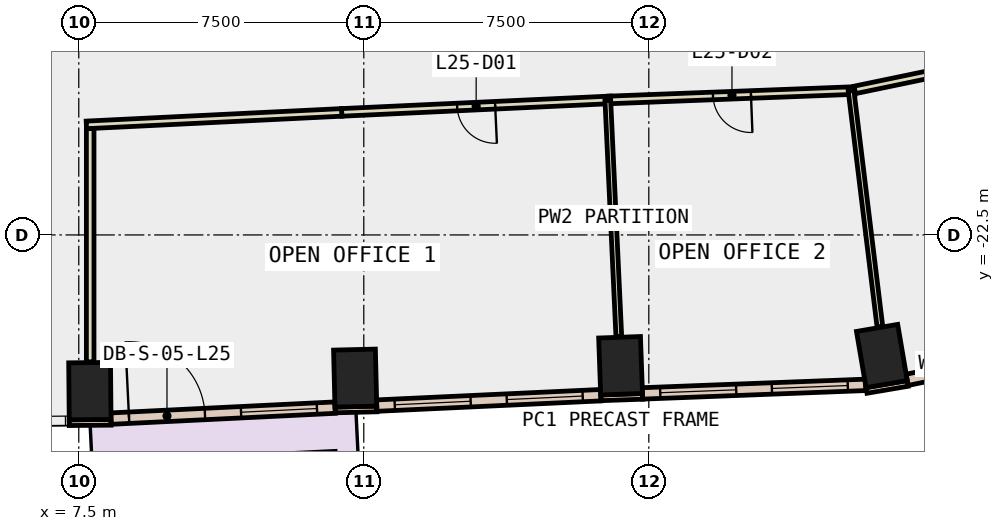
"""IFC4 building model, lengths in metres.
Left out: names, types, materials, properties, quantities, classifications, styles, units other than length and angle.
Written with IfcOpenShell. Run it as: python <this file> out.ifc"""

import sys

from ifc_helpers import new_model, si_unit, direction, frame, frame_2d, origin, origin_2d, place, context, subcontext, project, spatial, rectangle, extrude, element, fill, save


model = new_model("IFC4")
c1 = context("Model", 3, precision=1e-05, world=origin(), true_north=direction((0.0, 1.0)))
c2 = subcontext(c1, "Body", "Model", "MODEL_VIEW")
j1 = project(units=[si_unit("LENGTHUNIT", "METRE"), si_unit("PLANEANGLEUNIT", "RADIAN")], contexts=[c1])
p1 = place(None, origin())
s1 = spatial("IfcSite", under=j1, at=p1, CompositionType="ELEMENT")
p2 = place(p1, origin())
s2 = spatial("IfcBuilding", under=s1, at=p2, CompositionType="ELEMENT")
p3 = place(p2, frame((0.0, 0.0, 116.0)))
s3 = spatial("IfcBuildingStorey", under=s2, at=p3, CompositionType="ELEMENT", Elevation=116.0)
for number, where, z_axis, x_axis in (
    (1, (7.792, -26.61, -0.4), (0.0, 0.0, 1.0), (1.0, 0.009, 0.0)),
    (2, (14.773, -26.267, -0.4), (0.0, 0.0, 1.0), (1.0, 0.024, 0.0)),
    (3, (21.757, -25.942, -0.4), (0.0, 0.0, 1.0), (0.999, 0.035, 0.0)),
    (4, (28.633, -25.686, -0.4), (0.0, 0.0, 1.0), (0.986, 0.168, 0.0)),
):
    element("IfcColumn", number, at=place(p3, frame(where, z_axis=z_axis, x_axis=x_axis)), inside=s3, PredefinedType="COLUMN", context=c2, shape_type="SweptSolid", body=[
        extrude(rectangle(XDim=1.1, YDim=1.5, at=origin_2d()), origin(), (0.0, 0.0, 1.0), 4.2),
    ])
p4 = place(p3, frame((7.249, -27.44, 0.0), z_axis=(0.0, 0.0, 1.0), x_axis=(0.99995860686, 0.009098602504, 0.0)))
e5 = element("IfcWall", 5, at=p4, inside=s3, PredefinedType="STANDARD", context=c2, shape_type="SweptSolid", body=[
    extrude(rectangle(XDim=1.1, YDim=0.15, at=frame_2d((0.55, 0.0))), origin(), (0.0, 0.0, 1.0), 3.8),
])
p5 = place(p3, frame((14.243, -27.105, 0.0), z_axis=(0.0, 0.0, 1.0), x_axis=(0.999723421029, 0.023517683673, 0.0)))
e6 = element("IfcWall", 6, at=p5, inside=s3, PredefinedType="STANDARD", context=c2, shape_type="SweptSolid", body=[
    extrude(rectangle(XDim=1.1, YDim=0.15, at=frame_2d((0.55, 0.0))), origin(), (0.0, 0.0, 1.0), 3.8),
])
p6 = place(p3, frame((21.237, -26.786, 0.0), z_axis=(0.0, 0.0, 1.0), x_axis=(0.999376638472, 0.035303462679, 0.0)))
e7 = element("IfcWall", 7, at=p6, inside=s3, PredefinedType="STANDARD", context=c2, shape_type="SweptSolid", body=[
    extrude(rectangle(XDim=1.1, YDim=0.15, at=frame_2d((0.55, 0.0))), origin(), (0.0, 0.0, 1.0), 3.8),
])
p7 = place(p3, frame((28.229, -26.592, 0.0), z_axis=(0.0, 0.0, 1.0), x_axis=(0.985763338892, 0.168138751323, 0.0)))
e8 = element("IfcWall", 8, at=p7, inside=s3, PredefinedType="STANDARD", context=c2, shape_type="SweptSolid", body=[
    extrude(rectangle(XDim=1.101, YDim=0.15, at=frame_2d((0.55, 0.0))), origin(), (0.0, 0.0, 1.0), 3.8),
])
p8 = place(p3, frame((8.347, -27.333, 0.0), z_axis=(0.0, 0.0, 1.0), x_axis=(0.998800343021, 0.048968099633, 0.0)))
e9 = element("IfcWall", 9, at=p8, inside=s3, PredefinedType="STANDARD", context=c2, shape_type="SweptSolid", body=[
    extrude(rectangle(XDim=5.903, YDim=0.3, at=frame_2d((2.952, 0.0))), origin(), (0.0, 0.0, 1.0), 3.8),
])
p9 = place(p8, frame((0.476, 0.0, 0.0)))
e10 = element("IfcOpeningElement", 10, at=p9, cuts=e9, PredefinedType="OPENING", context=c2, shape_type="SweptSolid", body=[
    extrude(rectangle(XDim=2.0, YDim=2.4, at=frame_2d((1.0, 1.2))), frame((0.0, 0.16, 0.0), z_axis=(0.0, -1.0, 0.0), x_axis=(1.0, 0.0, 0.0)), (0.0, 0.0, 1.0), 0.32),
])
p10 = place(p8, frame((3.427, 0.0, 0.9)))
e11 = element("IfcOpeningElement", 11, at=p10, cuts=e9, PredefinedType="OPENING", context=c2, shape_type="SweptSolid", body=[
    extrude(rectangle(XDim=2.0, YDim=2.6, at=frame_2d((1.0, 1.3))), frame((0.0, 0.16, 0.0), z_axis=(0.0, -1.0, 0.0), x_axis=(1.0, 0.0, 0.0)), (0.0, 0.0, 1.0), 0.32),
])
p11 = place(p3, frame((15.34, -26.991, 0.0), z_axis=(0.0, 0.0, 1.0), x_axis=(0.998922139094, 0.046417238469, 0.0)))
e12 = element("IfcWall", 12, at=p11, inside=s3, PredefinedType="STANDARD", context=c2, shape_type="SweptSolid", body=[
    extrude(rectangle(XDim=5.901, YDim=0.3, at=frame_2d((2.951, 0.0))), origin(), (0.0, 0.0, 1.0), 3.8),
])
p12 = place(p11, frame((0.475, 0.0, 0.9)))
e13 = element("IfcOpeningElement", 13, at=p12, cuts=e12, PredefinedType="OPENING", context=c2, shape_type="SweptSolid", body=[
    extrude(rectangle(XDim=2.0, YDim=2.6, at=frame_2d((1.0, 1.3))), frame((0.0, 0.16, 0.0), z_axis=(0.0, -1.0, 0.0), x_axis=(1.0, 0.0, 0.0)), (0.0, 0.0, 1.0), 0.32),
])
p13 = place(p11, frame((3.426, 0.0, 0.9)))
e14 = element("IfcOpeningElement", 14, at=p13, cuts=e12, PredefinedType="OPENING", context=c2, shape_type="SweptSolid", body=[
    extrude(rectangle(XDim=2.0, YDim=2.6, at=frame_2d((1.0, 1.3))), frame((0.0, 0.16, 0.0), z_axis=(0.0, -1.0, 0.0), x_axis=(1.0, 0.0, 0.0)), (0.0, 0.0, 1.0), 0.32),
])
p14 = place(p3, frame((22.332, -26.67, 0.0), z_axis=(0.0, 0.0, 1.0), x_axis=(0.999267908582, 0.038257638169, 0.0)))
e15 = element("IfcWall", 15, at=p14, inside=s3, PredefinedType="STANDARD", context=c2, shape_type="SweptSolid", body=[
    extrude(rectangle(XDim=5.877, YDim=0.3, at=frame_2d((2.939, 0.0))), origin(), (0.0, 0.0, 1.0), 3.8),
])
p15 = place(p14, frame((0.469, 0.0, 0.9)))
e16 = element("IfcOpeningElement", 16, at=p15, cuts=e15, PredefinedType="OPENING", context=c2, shape_type="SweptSolid", body=[
    extrude(rectangle(XDim=2.0, YDim=2.6, at=frame_2d((1.0, 1.3))), frame((0.0, 0.16, 0.0), z_axis=(0.0, -1.0, 0.0), x_axis=(1.0, 0.0, 0.0)), (0.0, 0.0, 1.0), 0.32),
])
p16 = place(p14, frame((3.408, 0.0, 0.9)))
e17 = element("IfcOpeningElement", 17, at=p16, cuts=e15, PredefinedType="OPENING", context=c2, shape_type="SweptSolid", body=[
    extrude(rectangle(XDim=2.0, YDim=2.6, at=frame_2d((1.0, 1.3))), frame((0.0, 0.16, 0.0), z_axis=(0.0, -1.0, 0.0), x_axis=(1.0, 0.0, 0.0)), (0.0, 0.0, 1.0), 0.32),
])
p17 = place(p3, frame((29.297, -26.313, 0.0), z_axis=(0.0, 0.0, 1.0), x_axis=(0.979080614496, 0.203472726227, 0.0)))
e18 = element("IfcWall", 18, at=p17, inside=s3, PredefinedType="STANDARD", context=c2, shape_type="SweptSolid", body=[
    extrude(rectangle(XDim=4.05, YDim=0.3, at=frame_2d((2.025, 0.0))), origin(), (0.0, 0.0, 1.0), 3.8),
])
p18 = place(p17, frame((1.325, 0.0, 0.9)))
e19 = element("IfcOpeningElement", 19, at=p18, cuts=e18, PredefinedType="OPENING", context=c2, shape_type="SweptSolid", body=[
    extrude(rectangle(XDim=1.4, YDim=2.6, at=frame_2d((0.7, 1.3))), frame((0.0, 0.16, 0.0), z_axis=(0.0, -1.0, 0.0), x_axis=(1.0, 0.0, 0.0)), (0.0, 0.0, 1.0), 0.32),
])
p19 = place(p3, frame((8.468, -28.879, 0.0), z_axis=(0.0, 0.0, 1.0), x_axis=(0.998802192145, 0.048930368554, 0.0)))
e20 = element("IfcWall", 20, at=p19, inside=s3, PredefinedType="STANDARD", context=c2, shape_type="SweptSolid", body=[
    extrude(rectangle(XDim=5.803, YDim=0.8, at=frame_2d((2.901, 0.0))), origin(), (0.0, 0.0, 1.0), 0.8),
])
p20 = place(p3, frame((21.496, -18.946, 0.0), z_axis=(0.0, 0.0, 1.0), x_axis=(-0.99891602876, -0.046548549767, 0.0)))
e21 = element("IfcWall", 21, at=p20, inside=s3, PredefinedType="PARTITIONING", context=c2, shape_type="SweptSolid", body=[
    extrude(rectangle(XDim=7.086, YDim=0.2, at=frame_2d((3.543, 0.0))), origin(), (0.0, 0.0, 1.0), 3.8),
])
p21 = place(p20, frame((3.043, 0.0, 0.0)))
e22 = element("IfcOpeningElement", 22, at=p21, cuts=e21, PredefinedType="OPENING", context=c2, shape_type="SweptSolid", body=[
    extrude(rectangle(XDim=1.0, YDim=2.1, at=frame_2d((0.5, 1.05))), frame((0.0, 0.11, 0.0), z_axis=(0.0, -1.0, 0.0), x_axis=(1.0, 0.0, 0.0)), (0.0, 0.0, 1.0), 0.22),
])
p22 = place(p3, frame((14.418, -19.276, 0.0), z_axis=(0.0, 0.0, 1.0), x_axis=(-0.998802248261, -0.04892922305, 0.0)))
e23 = element("IfcWall", 23, at=p22, inside=s3, PredefinedType="PARTITIONING", context=c2, shape_type="SweptSolid", body=[
    extrude(rectangle(XDim=6.726, YDim=0.2, at=frame_2d((3.363, 0.0))), origin(), (0.0, 0.0, 1.0), 3.8),
])
p23 = place(p3, frame((27.922, -18.7, 0.0), z_axis=(0.0, 0.0, 1.0), x_axis=(-0.999265458352, -0.038321583274, 0.0)))
e24 = element("IfcWall", 24, at=p23, inside=s3, PredefinedType="PARTITIONING", context=c2, shape_type="SweptSolid", body=[
    extrude(rectangle(XDim=6.473, YDim=0.2, at=frame_2d((3.236, 0.0))), origin(), (0.0, 0.0, 1.0), 3.8),
])
p24 = place(p23, frame((2.736, 0.0, 0.0)))
e25 = element("IfcOpeningElement", 25, at=p24, cuts=e24, PredefinedType="OPENING", context=c2, shape_type="SweptSolid", body=[
    extrude(rectangle(XDim=1.0, YDim=2.1, at=frame_2d((0.5, 1.05))), frame((0.0, 0.11, 0.0), z_axis=(0.0, -1.0, 0.0), x_axis=(1.0, 0.0, 0.0)), (0.0, 0.0, 1.0), 0.22),
])
p25 = place(p3, frame((30.209, -18.208, 0.0), z_axis=(0.0, 0.0, 1.0), x_axis=(-0.979049860969, -0.203620651545, 0.0)))
e26 = element("IfcWall", 26, at=p25, inside=s3, PredefinedType="PARTITIONING", context=c2, shape_type="SweptSolid", body=[
    extrude(rectangle(XDim=2.338, YDim=0.2, at=frame_2d((1.169, 0.0))), origin(), (0.0, 0.0, 1.0), 3.8),
])
p26 = place(p3, frame((7.8, -19.701, 0.0), z_axis=(0.0, 0.0, 1.0), x_axis=(0.0, -1.0, 0.0)))
e27 = element("IfcWall", 27, at=p26, inside=s3, PredefinedType="PARTITIONING", context=c2, shape_type="SweptSolid", body=[
    extrude(rectangle(XDim=6.139, YDim=0.2, at=frame_2d((3.07, 0.0))), origin(), (0.0, 0.0, 1.0), 3.8),
])
p27 = place(p3, frame((21.421, -18.95, 0.0), z_axis=(0.0, 0.0, 1.0), x_axis=(0.046555976109, -0.998915682672, 0.0)))
e28 = element("IfcWall", 28, at=p27, inside=s3, PredefinedType="PARTITIONING", context=c2, shape_type="SweptSolid", body=[
    extrude(rectangle(XDim=6.23, YDim=0.15, at=frame_2d((3.115, 0.0))), origin(), (0.0, 0.0, 1.0), 3.8),
])
p28 = place(p3, frame((27.822, -18.704, 0.0), z_axis=(0.0, 0.0, 1.0), x_axis=(0.121325411006, -0.992612786863, 0.0)))
e29 = element("IfcWall", 29, at=p28, inside=s3, PredefinedType="PARTITIONING", context=c2, shape_type="SweptSolid", body=[
    extrude(rectangle(XDim=6.256, YDim=0.15, at=frame_2d((3.128, 0.0))), origin(), (0.0, 0.0, 1.0), 3.8),
])
p29 = place(p9, origin())
e30 = element("IfcDoor", 30, at=p29, inside=s3, OperationType="SLIDING_TO_LEFT", PredefinedType="DOOR", context=c2, shape_type="SweptSolid", body=[
    extrude(rectangle(XDim=2.0, YDim=2.4, at=frame_2d((1.0, 1.2))), frame((0.0, 0.025, 0.0), z_axis=(0.0, -1.0, 0.0), x_axis=(1.0, 0.0, 0.0)), (0.0, 0.0, 1.0), 0.05),
])
fill(e10, e30)
p30 = place(p10, origin())
e31 = element("IfcWindow", 31, at=p30, inside=s3, PartitioningType="SINGLE_PANEL", PredefinedType="WINDOW", context=c2, shape_type="SweptSolid", body=[
    extrude(rectangle(XDim=2.0, YDim=2.6, at=frame_2d((1.0, 1.3))), frame((0.0, 0.03, 0.0), z_axis=(0.0, -1.0, 0.0), x_axis=(1.0, 0.0, 0.0)), (0.0, 0.0, 1.0), 0.06),
])
fill(e11, e31)
p31 = place(p12, origin())
e32 = element("IfcWindow", 32, at=p31, inside=s3, PartitioningType="SINGLE_PANEL", PredefinedType="WINDOW", context=c2, shape_type="SweptSolid", body=[
    extrude(rectangle(XDim=2.0, YDim=2.6, at=frame_2d((1.0, 1.3))), frame((0.0, 0.03, 0.0), z_axis=(0.0, -1.0, 0.0), x_axis=(1.0, 0.0, 0.0)), (0.0, 0.0, 1.0), 0.06),
])
fill(e13, e32)
p32 = place(p13, origin())
e33 = element("IfcWindow", 33, at=p32, inside=s3, PartitioningType="SINGLE_PANEL", PredefinedType="WINDOW", context=c2, shape_type="SweptSolid", body=[
    extrude(rectangle(XDim=2.0, YDim=2.6, at=frame_2d((1.0, 1.3))), frame((0.0, 0.03, 0.0), z_axis=(0.0, -1.0, 0.0), x_axis=(1.0, 0.0, 0.0)), (0.0, 0.0, 1.0), 0.06),
])
fill(e14, e33)
p33 = place(p15, origin())
e34 = element("IfcWindow", 34, at=p33, inside=s3, PartitioningType="SINGLE_PANEL", PredefinedType="WINDOW", context=c2, shape_type="SweptSolid", body=[
    extrude(rectangle(XDim=2.0, YDim=2.6, at=frame_2d((1.0, 1.3))), frame((0.0, 0.03, 0.0), z_axis=(0.0, -1.0, 0.0), x_axis=(1.0, 0.0, 0.0)), (0.0, 0.0, 1.0), 0.06),
])
fill(e16, e34)
p34 = place(p16, origin())
e35 = element("IfcWindow", 35, at=p34, inside=s3, PartitioningType="SINGLE_PANEL", PredefinedType="WINDOW", context=c2, shape_type="SweptSolid", body=[
    extrude(rectangle(XDim=2.0, YDim=2.6, at=frame_2d((1.0, 1.3))), frame((0.0, 0.03, 0.0), z_axis=(0.0, -1.0, 0.0), x_axis=(1.0, 0.0, 0.0)), (0.0, 0.0, 1.0), 0.06),
])
fill(e17, e35)
p35 = place(p21, origin())
e36 = element("IfcDoor", 36, at=p35, inside=s3, OperationType="SINGLE_SWING_LEFT", PredefinedType="DOOR", context=c2, shape_type="SweptSolid", body=[
    extrude(rectangle(XDim=1.0, YDim=2.1, at=frame_2d((0.5, 1.05))), frame((0.0, 0.025, 0.0), z_axis=(0.0, -1.0, 0.0), x_axis=(1.0, 0.0, 0.0)), (0.0, 0.0, 1.0), 0.05),
])
fill(e22, e36)
p36 = place(p24, origin())
e37 = element("IfcDoor", 37, at=p36, inside=s3, OperationType="SINGLE_SWING_LEFT", PredefinedType="DOOR", context=c2, shape_type="SweptSolid", body=[
    extrude(rectangle(XDim=1.0, YDim=2.1, at=frame_2d((0.5, 1.05))), frame((0.0, 0.025, 0.0), z_axis=(0.0, -1.0, 0.0), x_axis=(1.0, 0.0, 0.0)), (0.0, 0.0, 1.0), 0.05),
])
fill(e25, e37)
save(model, sys.argv[1])
